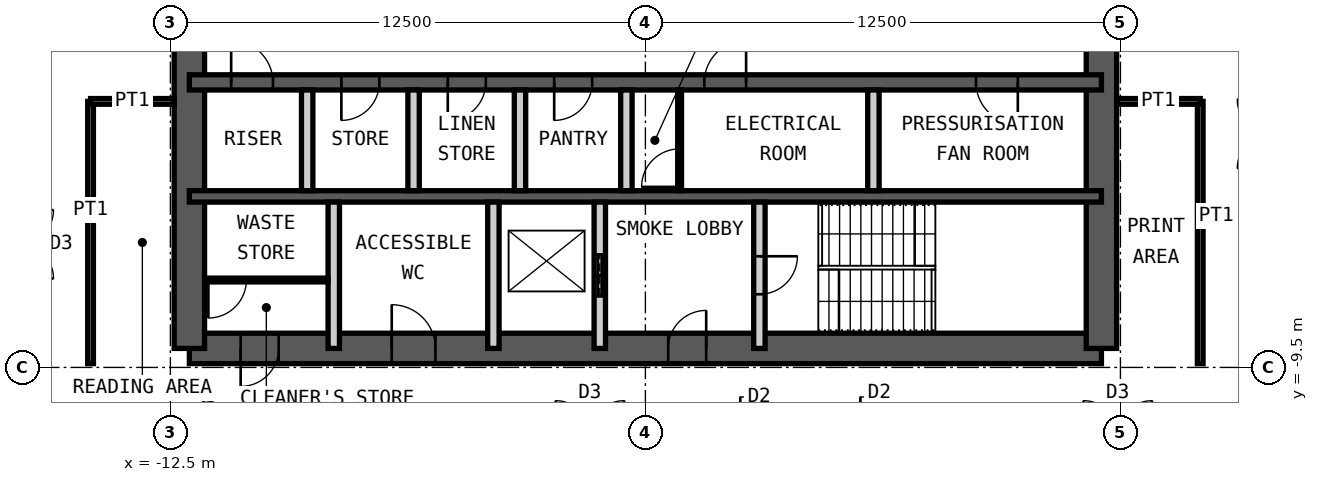
"""IFC4 building model, lengths in metres.
Left out: names, types, materials, properties, quantities, classifications, styles, units other than length and angle.
Written with IfcOpenShell. Run it as: python <this file> out.ifc"""

import sys

from ifc_helpers import new_model, si_unit, direction, frame, frame_2d, origin, place, context, subcontext, project, spatial, rectangle, extrude, element, fill, save


model = new_model("IFC4")
c1 = context("Model", 3, precision=1e-05, world=origin(), true_north=direction((0.0, 1.0)))
c2 = subcontext(c1, "Body", "Model", "MODEL_VIEW")
j1 = project(units=[si_unit("LENGTHUNIT", "METRE"), si_unit("PLANEANGLEUNIT", "RADIAN")], contexts=[c1])
p1 = place(None, origin())
s1 = spatial("IfcSite", under=j1, at=p1, CompositionType="ELEMENT")
p2 = place(p1, origin())
s2 = spatial("IfcBuilding", under=s1, at=p2, CompositionType="ELEMENT")
p3 = place(p2, frame((0.0, 0.0, 312.4)))
s3 = spatial("IfcBuildingStorey", under=s2, at=p3, CompositionType="ELEMENT", Elevation=312.4)
p4 = place(p3, frame((-12.0, -9.0, 0.0), z_axis=(0.0, 0.0, 1.0), x_axis=(1.0, 0.0, 0.0)))
e1 = element("IfcWall", 1, at=p4, inside=s3, PredefinedType="SHEAR", context=c2, shape_type="SweptSolid", body=[
    extrude(rectangle(XDim=24.0, YDim=0.8, at=frame_2d((12.0, 0.0))), origin(), (0.0, 0.0, 1.0), 4.2),
])
p5 = place(p4, frame((1.35, 0.0, 0.0)))
e2 = element("IfcOpeningElement", 2, at=p5, cuts=e1, PredefinedType="OPENING", context=c2, shape_type="SweptSolid", body=[
    extrude(rectangle(XDim=1.0, YDim=2.1, at=frame_2d((0.5, 1.05))), frame((0.0, 0.41, 0.0), z_axis=(0.0, -1.0, 0.0), x_axis=(1.0, 0.0, 0.0)), (0.0, 0.0, 1.0), 0.82),
])
p6 = place(p4, frame((5.325, 0.0, 0.0)))
e3 = element("IfcOpeningElement", 3, at=p6, cuts=e1, PredefinedType="OPENING", context=c2, shape_type="SweptSolid", body=[
    extrude(rectangle(XDim=1.15, YDim=2.1, at=frame_2d((0.575, 1.05))), frame((0.0, 0.41, 0.0), z_axis=(0.0, -1.0, 0.0), x_axis=(1.0, 0.0, 0.0)), (0.0, 0.0, 1.0), 0.82),
])
p7 = place(p4, frame((12.6, 0.0, 0.0)))
e4 = element("IfcOpeningElement", 4, at=p7, cuts=e1, PredefinedType="OPENING", context=c2, shape_type="SweptSolid", body=[
    extrude(rectangle(XDim=1.0, YDim=2.1, at=frame_2d((0.5, 1.05))), frame((0.0, 0.41, 0.0), z_axis=(0.0, -1.0, 0.0), x_axis=(1.0, 0.0, 0.0)), (0.0, 0.0, 1.0), 0.82),
])
p8 = place(p3, frame((12.0, -9.0, 0.0), z_axis=(0.0, 0.0, 1.0), x_axis=(0.0, 1.0, 0.0)))
e5 = element("IfcWall", 5, at=p8, inside=s3, PredefinedType="SHEAR", context=c2, shape_type="SweptSolid", body=[
    extrude(rectangle(XDim=18.0, YDim=0.8, at=frame_2d((9.0, 0.0))), origin(), (0.0, 0.0, 1.0), 4.2),
])
p9 = place(p8, frame((8.1, 0.0, 0.0)))
e6 = element("IfcOpeningElement", 6, at=p9, cuts=e5, PredefinedType="OPENING", context=c2, shape_type="SweptSolid", body=[
    extrude(rectangle(XDim=1.8, YDim=2.1, at=frame_2d((0.9, 1.05))), frame((0.0, 0.41, 0.0), z_axis=(0.0, -1.0, 0.0), x_axis=(1.0, 0.0, 0.0)), (0.0, 0.0, 1.0), 0.82),
])
p10 = place(p3, frame((-12.0, -9.0, 0.0), z_axis=(0.0, 0.0, 1.0), x_axis=(0.0, 1.0, 0.0)))
e7 = element("IfcWall", 7, at=p10, inside=s3, PredefinedType="SHEAR", context=c2, shape_type="SweptSolid", body=[
    extrude(rectangle(XDim=18.0, YDim=0.8, at=frame_2d((9.0, 0.0))), origin(), (0.0, 0.0, 1.0), 4.2),
])
p11 = place(p10, frame((8.1, 0.0, 0.0)))
e8 = element("IfcOpeningElement", 8, at=p11, cuts=e7, PredefinedType="OPENING", context=c2, shape_type="SweptSolid", body=[
    extrude(rectangle(XDim=1.8, YDim=2.1, at=frame_2d((0.9, 1.05))), frame((0.0, 0.41, 0.0), z_axis=(0.0, -1.0, 0.0), x_axis=(1.0, 0.0, 0.0)), (0.0, 0.0, 1.0), 0.82),
])
p12 = place(p3, frame((-12.0, -2.0, 0.0), z_axis=(0.0, 0.0, 1.0), x_axis=(1.0, 0.0, 0.0)))
e9 = element("IfcWall", 9, at=p12, inside=s3, PredefinedType="SHEAR", context=c2, shape_type="SweptSolid", body=[
    extrude(rectangle(XDim=24.0, YDim=0.4, at=frame_2d((12.0, 0.0))), origin(), (0.0, 0.0, 1.0), 4.2),
])
p13 = place(p12, frame((1.1, 0.0, 0.0)))
e10 = element("IfcOpeningElement", 10, at=p13, cuts=e9, PredefinedType="OPENING", context=c2, shape_type="SweptSolid", body=[
    extrude(rectangle(XDim=1.1, YDim=2.1, at=frame_2d((0.55, 1.05))), frame((0.0, 0.21, 0.0), z_axis=(0.0, -1.0, 0.0), x_axis=(1.0, 0.0, 0.0)), (0.0, 0.0, 1.0), 0.42),
])
p14 = place(p12, frame((13.55, 0.0, 0.0)))
e11 = element("IfcOpeningElement", 11, at=p14, cuts=e9, PredefinedType="OPENING", context=c2, shape_type="SweptSolid", body=[
    extrude(rectangle(XDim=1.1, YDim=2.1, at=frame_2d((0.55, 1.05))), frame((0.0, 0.21, 0.0), z_axis=(0.0, -1.0, 0.0), x_axis=(1.0, 0.0, 0.0)), (0.0, 0.0, 1.0), 0.42),
])
p15 = place(p12, frame((20.7, 0.0, 0.0)))
e12 = element("IfcOpeningElement", 12, at=p15, cuts=e9, PredefinedType="OPENING", context=c2, shape_type="SweptSolid", body=[
    extrude(rectangle(XDim=1.1, YDim=2.1, at=frame_2d((0.55, 1.05))), frame((0.0, 0.21, 0.0), z_axis=(0.0, -1.0, 0.0), x_axis=(1.0, 0.0, 0.0)), (0.0, 0.0, 1.0), 0.42),
])
p16 = place(p12, frame((4.0, 0.0, 0.0)))
e13 = element("IfcOpeningElement", 13, at=p16, cuts=e9, PredefinedType="OPENING", context=c2, shape_type="SweptSolid", body=[
    extrude(rectangle(XDim=1.0, YDim=2.1, at=frame_2d((0.5, 1.05))), frame((0.0, 0.21, 0.0), z_axis=(0.0, -1.0, 0.0), x_axis=(1.0, 0.0, 0.0)), (0.0, 0.0, 1.0), 0.42),
])
p17 = place(p12, frame((6.8, 0.0, 0.0)))
e14 = element("IfcOpeningElement", 14, at=p17, cuts=e9, PredefinedType="OPENING", context=c2, shape_type="SweptSolid", body=[
    extrude(rectangle(XDim=1.0, YDim=2.1, at=frame_2d((0.5, 1.05))), frame((0.0, 0.21, 0.0), z_axis=(0.0, -1.0, 0.0), x_axis=(1.0, 0.0, 0.0)), (0.0, 0.0, 1.0), 0.42),
])
p18 = place(p12, frame((9.6, 0.0, 0.0)))
e15 = element("IfcOpeningElement", 15, at=p18, cuts=e9, PredefinedType="OPENING", context=c2, shape_type="SweptSolid", body=[
    extrude(rectangle(XDim=1.0, YDim=2.1, at=frame_2d((0.5, 1.05))), frame((0.0, 0.21, 0.0), z_axis=(0.0, -1.0, 0.0), x_axis=(1.0, 0.0, 0.0)), (0.0, 0.0, 1.0), 0.42),
])
p19 = place(p3, frame((-12.0, -5.0, 0.0), z_axis=(0.0, 0.0, 1.0), x_axis=(1.0, 0.0, 0.0)))
e16 = element("IfcWall", 16, at=p19, inside=s3, PredefinedType="SHEAR", context=c2, shape_type="SweptSolid", body=[
    extrude(rectangle(XDim=24.0, YDim=0.3, at=frame_2d((12.0, 0.0))), origin(), (0.0, 0.0, 1.0), 4.2),
])
for number, where, z_axis, x_axis in (
    (17, (-8.9, -4.85, 0.0), (0.0, 0.0, 1.0), (0.0, 1.0, 0.0)),
    (18, (-6.1, -4.85, 0.0), (0.0, 0.0, 1.0), (0.0, 1.0, 0.0)),
    (19, (-3.3, -4.85, 0.0), (0.0, 0.0, 1.0), (0.0, 1.0, 0.0)),
    (20, (-0.5, -4.85, 0.0), (0.0, 0.0, 1.0), (0.0, 1.0, 0.0)),
    (21, (6.0, -4.85, 0.0), (0.0, 0.0, 1.0), (0.0, 1.0, 0.0)),
):
    element("IfcWall", number, at=place(p3, frame(where, z_axis=z_axis, x_axis=x_axis)), inside=s3, PredefinedType="PARTITIONING", context=c2, shape_type="SweptSolid", body=[
        extrude(rectangle(XDim=2.65, YDim=0.3, at=frame_2d((1.325, 0.0))), origin(), (0.0, 0.0, 1.0), 3.98),
    ])
for number, where, z_axis, x_axis in (
    (22, (-8.2, -9.0, 0.0), (0.0, 0.0, 1.0), (0.0, 1.0, 0.0)),
    (23, (-4.0, -9.0, 0.0), (0.0, 0.0, 1.0), (0.0, 1.0, 0.0)),
):
    element("IfcWall", number, at=place(p3, frame(where, z_axis=z_axis, x_axis=x_axis)), inside=s3, PredefinedType="PARTITIONING", context=c2, shape_type="SweptSolid", body=[
        extrude(rectangle(XDim=3.85, YDim=0.3, at=frame_2d((1.925, 0.0))), origin(), (0.0, 0.0, 1.0), 3.98),
    ])
p20 = place(p3, frame((-1.2, -9.0, 0.0), z_axis=(0.0, 0.0, 1.0), x_axis=(0.0, 1.0, 0.0)))
e24 = element("IfcWall", 24, at=p20, inside=s3, PredefinedType="PARTITIONING", context=c2, shape_type="SweptSolid", body=[
    extrude(rectangle(XDim=3.85, YDim=0.3, at=frame_2d((1.925, 0.0))), origin(), (0.0, 0.0, 1.0), 3.98),
])
p21 = place(p20, frame((1.375, 0.0, 0.0)))
e25 = element("IfcOpeningElement", 25, at=p21, cuts=e24, PredefinedType="OPENING", context=c2, shape_type="SweptSolid", body=[
    extrude(rectangle(XDim=1.1, YDim=2.4, at=frame_2d((0.55, 1.2))), frame((0.0, 0.16, 0.0), z_axis=(0.0, -1.0, 0.0), x_axis=(1.0, 0.0, 0.0)), (0.0, 0.0, 1.0), 0.32),
])
p22 = place(p3, frame((3.0, -9.0, 0.0), z_axis=(0.0, 0.0, 1.0), x_axis=(0.0, 1.0, 0.0)))
e26 = element("IfcWall", 26, at=p22, inside=s3, PredefinedType="PARTITIONING", context=c2, shape_type="SweptSolid", body=[
    extrude(rectangle(XDim=3.85, YDim=0.3, at=frame_2d((1.925, 0.0))), origin(), (0.0, 0.0, 1.0), 3.98),
])
p23 = place(p22, frame((1.425, 0.0, 0.0)))
e27 = element("IfcOpeningElement", 27, at=p23, cuts=e26, PredefinedType="OPENING", context=c2, shape_type="SweptSolid", body=[
    extrude(rectangle(XDim=1.0, YDim=2.1, at=frame_2d((0.5, 1.05))), frame((0.0, 0.16, 0.0), z_axis=(0.0, -1.0, 0.0), x_axis=(1.0, 0.0, 0.0)), (0.0, 0.0, 1.0), 0.32),
])
p24 = place(p3, frame((0.9, -4.85, 0.0), z_axis=(0.0, 0.0, 1.0), x_axis=(0.0, 1.0, 0.0)))
e28 = element("IfcWall", 28, at=p24, inside=s3, PredefinedType="PARTITIONING", context=c2, shape_type="SweptSolid", body=[
    extrude(rectangle(XDim=2.65, YDim=0.1, at=frame_2d((1.325, 0.0))), origin(), (0.0, 0.0, 1.0), 3.98),
])
p25 = place(p24, frame((0.1, 0.0, 0.0)))
e29 = element("IfcOpeningElement", 29, at=p25, cuts=e28, PredefinedType="OPENING", context=c2, shape_type="SweptSolid", body=[
    extrude(rectangle(XDim=1.0, YDim=2.4, at=frame_2d((0.5, 1.2))), frame((0.0, 0.06, 0.0), z_axis=(0.0, -1.0, 0.0), x_axis=(1.0, 0.0, 0.0)), (0.0, 0.0, 1.0), 0.12),
])
p26 = place(p3, frame((-11.6, -7.2, 0.0), z_axis=(0.0, 0.0, 1.0), x_axis=(1.0, 0.0, 0.0)))
e30 = element("IfcWall", 30, at=p26, inside=s3, PredefinedType="PARTITIONING", context=c2, shape_type="SweptSolid", body=[
    extrude(rectangle(XDim=3.25, YDim=0.1, at=frame_2d((1.625, 0.0))), origin(), (0.0, 0.0, 1.0), 3.98),
])
p27 = place(p26, frame((0.1, 0.0, 0.0)))
e31 = element("IfcOpeningElement", 31, at=p27, cuts=e30, PredefinedType="OPENING", context=c2, shape_type="SweptSolid", body=[
    extrude(rectangle(XDim=1.0, YDim=2.4, at=frame_2d((0.5, 1.2))), frame((0.0, 0.06, 0.0), z_axis=(0.0, -1.0, 0.0), x_axis=(1.0, 0.0, 0.0)), (0.0, 0.0, 1.0), 0.12),
])
p28 = place(p3, frame((14.6, -9.4, 0.0), z_axis=(0.0, 0.0, 1.0), x_axis=(0.0, 1.0, 0.0)))
e32 = element("IfcWall", 32, at=p28, inside=s3, PredefinedType="PARTITIONING", context=c2, shape_type="SweptSolid", body=[
    extrude(rectangle(XDim=6.9, YDim=0.15, at=frame_2d((3.45, 0.0))), origin(), (0.0, 0.0, 1.0), 4.03),
])
p29 = place(p3, frame((12.4, -2.5, 0.0), z_axis=(0.0, 0.0, 1.0), x_axis=(1.0, 0.0, 0.0)))
e33 = element("IfcWall", 33, at=p29, inside=s3, PredefinedType="PARTITIONING", context=c2, shape_type="SweptSolid", body=[
    extrude(rectangle(XDim=2.2, YDim=0.15, at=frame_2d((1.1, 0.0))), origin(), (0.0, 0.0, 1.0), 3.33),
])
p30 = place(p3, frame((-14.6, -9.4, 0.0), z_axis=(0.0, 0.0, 1.0), x_axis=(0.0, 1.0, 0.0)))
e34 = element("IfcWall", 34, at=p30, inside=s3, PredefinedType="PARTITIONING", context=c2, shape_type="SweptSolid", body=[
    extrude(rectangle(XDim=6.9, YDim=0.15, at=frame_2d((3.45, 0.0))), origin(), (0.0, 0.0, 1.0), 4.03),
])
p31 = place(p3, frame((-12.4, -2.5, 0.0), z_axis=(0.0, 0.0, 1.0), x_axis=(-1.0, 0.0, 0.0)))
e35 = element("IfcWall", 35, at=p31, inside=s3, PredefinedType="PARTITIONING", context=c2, shape_type="SweptSolid", body=[
    extrude(rectangle(XDim=2.2, YDim=0.15, at=frame_2d((1.1, 0.0))), origin(), (0.0, 0.0, 1.0), 3.53),
])
p32 = place(p5, origin())
e36 = element("IfcDoor", 36, at=p32, inside=s3, OperationType="SINGLE_SWING_LEFT", PredefinedType="DOOR", context=c2, shape_type="SweptSolid", body=[
    extrude(rectangle(XDim=1.0, YDim=2.1, at=frame_2d((0.5, 1.05))), frame((0.0, 0.025, 0.0), z_axis=(0.0, -1.0, 0.0), x_axis=(1.0, 0.0, 0.0)), (0.0, 0.0, 1.0), 0.05),
])
fill(e2, e36)
p33 = place(p6, origin())
e37 = element("IfcDoor", 37, at=p33, inside=s3, OperationType="SINGLE_SWING_RIGHT", PredefinedType="DOOR", context=c2, shape_type="SweptSolid", body=[
    extrude(rectangle(XDim=1.15, YDim=2.1, at=frame_2d((0.575, 1.05))), frame((0.0, 0.025, 0.0), z_axis=(0.0, -1.0, 0.0), x_axis=(1.0, 0.0, 0.0)), (0.0, 0.0, 1.0), 0.05),
])
fill(e3, e37)
p34 = place(p7, origin())
e38 = element("IfcDoor", 38, at=p34, inside=s3, OperationType="SINGLE_SWING_LEFT", PredefinedType="DOOR", context=c2, shape_type="SweptSolid", body=[
    extrude(rectangle(XDim=1.0, YDim=2.1, at=frame_2d((0.5, 1.05))), frame((0.0, 0.025, 0.0), z_axis=(0.0, -1.0, 0.0), x_axis=(1.0, 0.0, 0.0)), (0.0, 0.0, 1.0), 0.05),
])
fill(e4, e38)
p35 = place(p23, origin())
e39 = element("IfcDoor", 39, at=p35, inside=s3, OperationType="SINGLE_SWING_RIGHT", PredefinedType="DOOR", context=c2, shape_type="SweptSolid", body=[
    extrude(rectangle(XDim=1.0, YDim=2.1, at=frame_2d((0.5, 1.05))), frame((0.0, 0.025, 0.0), z_axis=(0.0, -1.0, 0.0), x_axis=(1.0, 0.0, 0.0)), (0.0, 0.0, 1.0), 0.05),
])
fill(e27, e39)
p36 = place(p13, origin())
e40 = element("IfcDoor", 40, at=p36, inside=s3, OperationType="SINGLE_SWING_RIGHT", PredefinedType="DOOR", context=c2, shape_type="SweptSolid", body=[
    extrude(rectangle(XDim=1.1, YDim=2.1, at=frame_2d((0.55, 1.05))), frame((0.0, 0.025, 0.0), z_axis=(0.0, -1.0, 0.0), x_axis=(1.0, 0.0, 0.0)), (0.0, 0.0, 1.0), 0.05),
])
fill(e10, e40)
p37 = place(p14, origin())
e41 = element("IfcDoor", 41, at=p37, inside=s3, OperationType="SINGLE_SWING_LEFT", PredefinedType="DOOR", context=c2, shape_type="SweptSolid", body=[
    extrude(rectangle(XDim=1.1, YDim=2.1, at=frame_2d((0.55, 1.05))), frame((0.0, 0.025, 0.0), z_axis=(0.0, -1.0, 0.0), x_axis=(1.0, 0.0, 0.0)), (0.0, 0.0, 1.0), 0.05),
])
fill(e11, e41)
p38 = place(p15, origin())
e42 = element("IfcDoor", 42, at=p38, inside=s3, OperationType="SINGLE_SWING_RIGHT", PredefinedType="DOOR", context=c2, shape_type="SweptSolid", body=[
    extrude(rectangle(XDim=1.1, YDim=2.1, at=frame_2d((0.55, 1.05))), frame((0.0, 0.025, 0.0), z_axis=(0.0, -1.0, 0.0), x_axis=(1.0, 0.0, 0.0)), (0.0, 0.0, 1.0), 0.05),
])
fill(e12, e42)
p39 = place(p21, origin())
e43 = element("IfcDoor", 43, at=p39, inside=s3, OperationType="DOUBLE_DOOR_SLIDING", PredefinedType="DOOR", context=c2, shape_type="SweptSolid", body=[
    extrude(rectangle(XDim=1.1, YDim=2.4, at=frame_2d((0.55, 1.2))), frame((0.0, 0.025, 0.0), z_axis=(0.0, -1.0, 0.0), x_axis=(1.0, 0.0, 0.0)), (0.0, 0.0, 1.0), 0.05),
])
fill(e25, e43)
p40 = place(p16, origin())
e44 = element("IfcDoor", 44, at=p40, inside=s3, OperationType="SINGLE_SWING_LEFT", PredefinedType="DOOR", context=c2, shape_type="SweptSolid", body=[
    extrude(rectangle(XDim=1.0, YDim=2.1, at=frame_2d((0.5, 1.05))), frame((0.0, 0.025, 0.0), z_axis=(0.0, -1.0, 0.0), x_axis=(1.0, 0.0, 0.0)), (0.0, 0.0, 1.0), 0.05),
])
fill(e13, e44)
p41 = place(p17, origin())
e45 = element("IfcDoor", 45, at=p41, inside=s3, OperationType="SINGLE_SWING_LEFT", PredefinedType="DOOR", context=c2, shape_type="SweptSolid", body=[
    extrude(rectangle(XDim=1.0, YDim=2.1, at=frame_2d((0.5, 1.05))), frame((0.0, 0.025, 0.0), z_axis=(0.0, -1.0, 0.0), x_axis=(1.0, 0.0, 0.0)), (0.0, 0.0, 1.0), 0.05),
])
fill(e14, e45)
p42 = place(p18, origin())
e46 = element("IfcDoor", 46, at=p42, inside=s3, OperationType="SINGLE_SWING_LEFT", PredefinedType="DOOR", context=c2, shape_type="SweptSolid", body=[
    extrude(rectangle(XDim=1.0, YDim=2.1, at=frame_2d((0.5, 1.05))), frame((0.0, 0.025, 0.0), z_axis=(0.0, -1.0, 0.0), x_axis=(1.0, 0.0, 0.0)), (0.0, 0.0, 1.0), 0.05),
])
fill(e15, e46)
p43 = place(p25, origin())
e47 = element("IfcDoor", 47, at=p43, inside=s3, OperationType="SINGLE_SWING_RIGHT", PredefinedType="DOOR", context=c2, shape_type="SweptSolid", body=[
    extrude(rectangle(XDim=1.0, YDim=2.4, at=frame_2d((0.5, 1.2))), frame((0.0, 0.025, 0.0), z_axis=(0.0, -1.0, 0.0), x_axis=(1.0, 0.0, 0.0)), (0.0, 0.0, 1.0), 0.05),
])
fill(e29, e47)
p44 = place(p27, origin())
e48 = element("IfcDoor", 48, at=p44, inside=s3, OperationType="SINGLE_SWING_LEFT", PredefinedType="DOOR", context=c2, shape_type="SweptSolid", body=[
    extrude(rectangle(XDim=1.0, YDim=2.4, at=frame_2d((0.5, 1.2))), frame((0.0, 0.025, 0.0), z_axis=(0.0, -1.0, 0.0), x_axis=(1.0, 0.0, 0.0)), (0.0, 0.0, 1.0), 0.05),
])
fill(e31, e48)
save(model, sys.argv[1])
